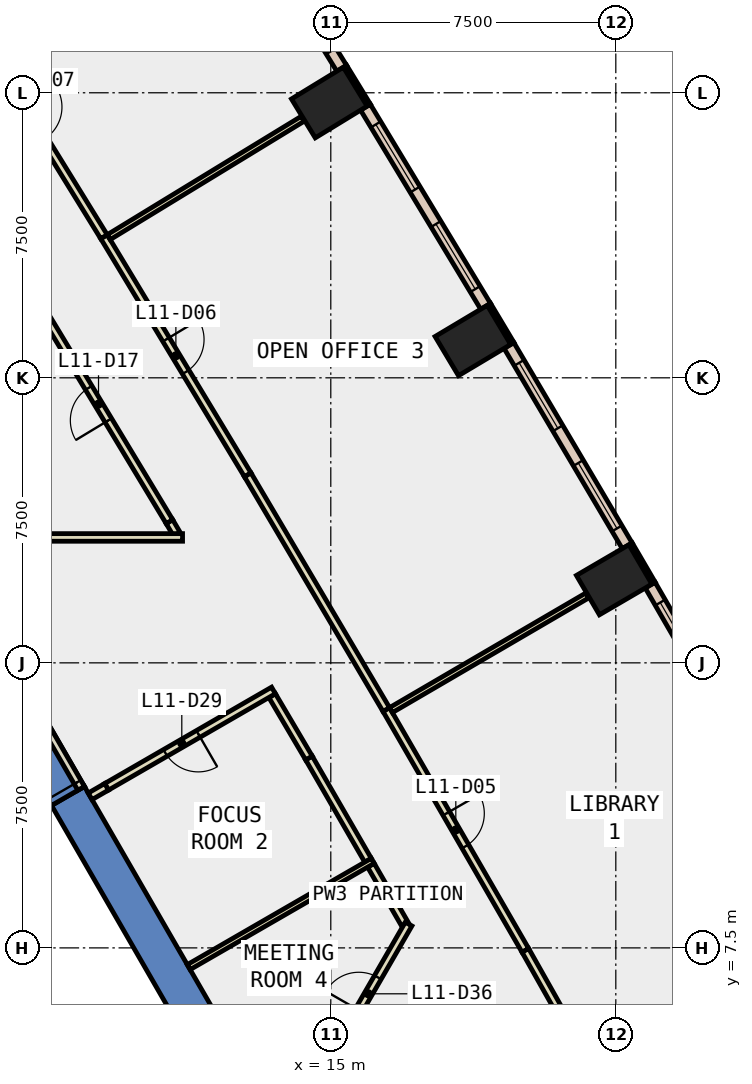
"""IFC4 building model, lengths in metres.
Left out: names, types, materials, properties, quantities, classifications, styles, units other than length and angle.
Written with IfcOpenShell. Run it as: python <this file> out.ifc"""

import sys

from ifc_helpers import new_model, si_unit, direction, frame, frame_2d, origin, origin_2d, place, context, subcontext, project, spatial, polyline, rectangle, outline, extrude, element, fill, save


model = new_model("IFC4")
c1 = context("Model", 3, precision=1e-05, world=origin(), true_north=direction((0.0, 1.0)))
c2 = subcontext(c1, "Body", "Model", "MODEL_VIEW")
j1 = project(units=[si_unit("LENGTHUNIT", "METRE"), si_unit("PLANEANGLEUNIT", "RADIAN")], contexts=[c1])
p1 = place(None, origin())
s1 = spatial("IfcSite", under=j1, at=p1, CompositionType="ELEMENT")
p2 = place(p1, origin())
s2 = spatial("IfcBuilding", under=s1, at=p2, CompositionType="ELEMENT")
p3 = place(p2, frame((0.0, 0.0, 56.0)))
s3 = spatial("IfcBuildingStorey", under=s2, at=p3, CompositionType="ELEMENT", Elevation=56.0)
for number, where, z_axis, x_axis in (
    (1, (22.457, 17.186, -0.4), (0.0, 0.0, 1.0), (-0.504, 0.864, 0.0)),
    (2, (18.739, 23.482, -0.4), (0.0, 0.0, 1.0), (-0.513, 0.858, 0.0)),
    (3, (14.961, 29.743, -0.4), (0.0, 0.0, 1.0), (-0.522, 0.853, 0.0)),
):
    element("IfcColumn", number, at=place(p3, frame(where, z_axis=z_axis, x_axis=x_axis)), inside=s3, PredefinedType="COLUMN", context=c2, shape_type="SweptSolid", body=[
        extrude(rectangle(XDim=1.2, YDim=1.6, at=origin_2d()), origin(), (0.0, 0.0, 1.0), 4.2),
    ])
p4 = place(p3, frame((0.0, 0.0, -0.4)))
e4 = element("IfcWall", 4, at=p4, inside=s3, PredefinedType="SHEAR", context=c2, shape_type="SweptSolid", body=[
    extrude(outline(polyline([(8.517, 11.748), (7.651, 11.248), (12.702, 2.5), (13.856, 2.5), (8.517, 11.748)])), origin(), (0.0, 0.0, 1.0), 4.2),
])
p5 = place(p3, frame((0.0, 0.0, 3.6)))
e5 = element("IfcWall", 5, at=p5, inside=s3, PredefinedType="SHEAR", context=c2, shape_type="SweptSolid", body=[
    extrude(outline(polyline([(7.517, 13.48), (6.651, 12.98), (7.651, 11.248), (8.517, 11.748), (7.517, 13.48)])), origin(), (0.0, 0.0, 1.0), 0.2),
])
p6 = place(p3, frame((23.493, 17.097, 0.0), z_axis=(0.0, 0.0, 1.0), x_axis=(-0.504225229382, 0.863572184623, 0.0)))
e6 = element("IfcWall", 6, at=p6, inside=s3, PredefinedType="STANDARD", context=c2, shape_type="SweptSolid", body=[
    extrude(rectangle(XDim=1.2, YDim=0.1, at=frame_2d((0.6, 0.0))), origin(), (0.0, 0.0, 1.0), 3.8),
])
for number, where, z_axis, x_axis in (
    (7, (19.777, 23.403, 0.0), (0.0, 0.0, 1.0), (-0.513, 0.858, 0.0)),
    (8, (15.999, 29.674, 0.0), (0.0, 0.0, 1.0), (-0.522, 0.853, 0.0)),
):
    element("IfcWall", number, at=place(p3, frame(where, z_axis=z_axis, x_axis=x_axis)), inside=s3, PredefinedType="STANDARD", context=c2, shape_type="SweptSolid", body=[
        extrude(rectangle(XDim=1.2, YDim=0.1, at=frame_2d((0.6, 0.0))), origin(), (0.0, 0.0, 1.0), 3.8),
    ])
p7 = place(p3, frame((26.464, 11.745, 0.0), z_axis=(0.0, 0.0, 1.0), x_axis=(-0.499957248001, 0.866050085256, 0.0)))
e9 = element("IfcWall", 9, at=p7, inside=s3, PredefinedType="STANDARD", context=c2, shape_type="SweptSolid", body=[
    extrude(rectangle(XDim=6.121, YDim=0.3, at=frame_2d((3.06, 0.0))), origin(), (0.0, 0.0, 1.0), 3.8),
])
p8 = place(p7, frame((0.53, 0.0, 0.9)))
e10 = element("IfcOpeningElement", 10, at=p8, cuts=e9, PredefinedType="OPENING", context=c2, shape_type="SweptSolid", body=[
    extrude(rectangle(XDim=2.0, YDim=2.6, at=frame_2d((1.0, 1.3))), frame((0.0, 0.16, 0.0), z_axis=(0.0, -1.0, 0.0), x_axis=(1.0, 0.0, 0.0)), (0.0, 0.0, 1.0), 0.32),
])
p9 = place(p7, frame((3.591, 0.0, 0.9)))
e11 = element("IfcOpeningElement", 11, at=p9, cuts=e9, PredefinedType="OPENING", context=c2, shape_type="SweptSolid", body=[
    extrude(rectangle(XDim=2.0, YDim=2.6, at=frame_2d((1.0, 1.3))), frame((0.0, 0.16, 0.0), z_axis=(0.0, -1.0, 0.0), x_axis=(1.0, 0.0, 0.0)), (0.0, 0.0, 1.0), 0.32),
])
p10 = place(p3, frame((22.8, 18.08, 0.0), z_axis=(0.0, 0.0, 1.0), x_axis=(-0.508412153373, 0.861113861404, 0.0)))
e12 = element("IfcWall", 12, at=p10, inside=s3, PredefinedType="STANDARD", context=c2, shape_type="SweptSolid", body=[
    extrude(rectangle(XDim=6.121, YDim=0.3, at=frame_2d((3.061, 0.0))), origin(), (0.0, 0.0, 1.0), 3.8),
])
p11 = place(p10, frame((0.53, 0.0, 0.9)))
e13 = element("IfcOpeningElement", 13, at=p11, cuts=e12, PredefinedType="OPENING", context=c2, shape_type="SweptSolid", body=[
    extrude(rectangle(XDim=2.0, YDim=2.6, at=frame_2d((1.0, 1.3))), frame((0.0, 0.16, 0.0), z_axis=(0.0, -1.0, 0.0), x_axis=(1.0, 0.0, 0.0)), (0.0, 0.0, 1.0), 0.32),
])
p12 = place(p10, frame((3.591, 0.0, 0.9)))
e14 = element("IfcOpeningElement", 14, at=p12, cuts=e12, PredefinedType="OPENING", context=c2, shape_type="SweptSolid", body=[
    extrude(rectangle(XDim=2.0, YDim=2.6, at=frame_2d((1.0, 1.3))), frame((0.0, 0.16, 0.0), z_axis=(0.0, -1.0, 0.0), x_axis=(1.0, 0.0, 0.0)), (0.0, 0.0, 1.0), 0.32),
])
p13 = place(p3, frame((19.074, 24.38, 0.0), z_axis=(0.0, 0.0, 1.0), x_axis=(-0.516699243123, 0.856166976796, 0.0)))
e15 = element("IfcWall", 15, at=p13, inside=s3, PredefinedType="STANDARD", context=c2, shape_type="SweptSolid", body=[
    extrude(rectangle(XDim=6.122, YDim=0.3, at=frame_2d((3.061, 0.0))), origin(), (0.0, 0.0, 1.0), 3.8),
])
p14 = place(p13, frame((0.53, 0.0, 0.9)))
e16 = element("IfcOpeningElement", 16, at=p14, cuts=e15, PredefinedType="OPENING", context=c2, shape_type="SweptSolid", body=[
    extrude(rectangle(XDim=2.0, YDim=2.6, at=frame_2d((1.0, 1.3))), frame((0.0, 0.16, 0.0), z_axis=(0.0, -1.0, 0.0), x_axis=(1.0, 0.0, 0.0)), (0.0, 0.0, 1.0), 0.32),
])
p15 = place(p13, frame((3.591, 0.0, 0.9)))
e17 = element("IfcOpeningElement", 17, at=p15, cuts=e15, PredefinedType="OPENING", context=c2, shape_type="SweptSolid", body=[
    extrude(rectangle(XDim=2.0, YDim=2.6, at=frame_2d((1.0, 1.3))), frame((0.0, 0.16, 0.0), z_axis=(0.0, -1.0, 0.0), x_axis=(1.0, 0.0, 0.0)), (0.0, 0.0, 1.0), 0.32),
])
p16 = place(p3, frame((15.287, 30.644, 0.0), z_axis=(0.0, 0.0, 1.0), x_axis=(-0.525114088226, 0.851031840971, 0.0)))
e18 = element("IfcWall", 18, at=p16, inside=s3, PredefinedType="STANDARD", context=c2, shape_type="SweptSolid", body=[
    extrude(rectangle(XDim=6.121, YDim=0.3, at=frame_2d((3.061, 0.0))), origin(), (0.0, 0.0, 1.0), 3.8),
])
p17 = place(p16, frame((0.53, 0.0, 0.9)))
e19 = element("IfcOpeningElement", 19, at=p17, cuts=e18, PredefinedType="OPENING", context=c2, shape_type="SweptSolid", body=[
    extrude(rectangle(XDim=2.0, YDim=2.6, at=frame_2d((1.0, 1.3))), frame((0.0, 0.16, 0.0), z_axis=(0.0, -1.0, 0.0), x_axis=(1.0, 0.0, 0.0)), (0.0, 0.0, 1.0), 0.32),
])
p18 = place(p16, frame((3.591, 0.0, 0.9)))
e20 = element("IfcOpeningElement", 20, at=p18, cuts=e18, PredefinedType="OPENING", context=c2, shape_type="SweptSolid", body=[
    extrude(rectangle(XDim=2.0, YDim=2.6, at=frame_2d((1.0, 1.3))), frame((0.0, 0.16, 0.0), z_axis=(0.0, -1.0, 0.0), x_axis=(1.0, 0.0, 0.0)), (0.0, 0.0, 1.0), 0.32),
])
p19 = place(p3, frame((15.98, 9.805, 0.0), z_axis=(0.0, 0.0, 1.0), x_axis=(-0.500150684419, 0.865938388614, 0.0)))
e21 = element("IfcWall", 21, at=p19, inside=s3, PredefinedType="PARTITIONING", context=c2, shape_type="SweptSolid", body=[
    extrude(rectangle(XDim=3.109, YDim=0.2, at=frame_2d((1.554, 0.0))), origin(), (0.0, 0.0, 1.0), 3.8),
])
p20 = place(p3, frame((14.425, 12.497, 0.0), z_axis=(0.0, 0.0, 1.0), x_axis=(-0.508111788435, 0.861291129905, 0.0)))
e22 = element("IfcWall", 22, at=p20, inside=s3, PredefinedType="PARTITIONING", context=c2, shape_type="SweptSolid", body=[
    extrude(rectangle(XDim=1.905, YDim=0.2, at=frame_2d((0.953, 0.0))), origin(), (0.0, 0.0, 1.0), 3.8),
])
p21 = place(p3, frame((13.492, 14.274, 0.0), z_axis=(0.0, 0.0, 1.0), x_axis=(-0.866003598361, -0.5000377662, 0.0)))
e23 = element("IfcWall", 23, at=p21, inside=s3, PredefinedType="PARTITIONING", context=c2, shape_type="SweptSolid", body=[
    extrude(rectangle(XDim=5.071, YDim=0.2, at=frame_2d((2.536, 0.0))), origin(), (0.0, 0.0, 1.0), 3.8),
])
p22 = place(p21, frame((2.286, 0.0, 0.0)))
e24 = element("IfcOpeningElement", 24, at=p22, cuts=e23, PredefinedType="OPENING", context=c2, shape_type="SweptSolid", body=[
    extrude(rectangle(XDim=1.0, YDim=2.1, at=frame_2d((0.5, 1.05))), frame((0.0, 0.11, 0.0), z_axis=(0.0, -1.0, 0.0), x_axis=(1.0, 0.0, 0.0)), (0.0, 0.0, 1.0), 0.22),
])
p23 = place(p3, frame((16.948, 8.128, 0.0), z_axis=(0.0, 0.0, 1.0), x_axis=(-0.499931460552, 0.866064971437, 0.0)))
e25 = element("IfcWall", 25, at=p23, inside=s3, PredefinedType="PARTITIONING", context=c2, shape_type="SweptSolid", body=[
    extrude(rectangle(XDim=1.786, YDim=0.2, at=frame_2d((0.893, 0.0))), origin(), (0.0, 0.0, 1.0), 3.8),
])
p24 = place(p3, frame((10.948, 18.386, 0.0), z_axis=(0.0, 0.0, 1.0), x_axis=(-0.506880801681, 0.862016155815, 0.0)))
e26 = element("IfcWall", 26, at=p24, inside=s3, PredefinedType="PARTITIONING", context=c2, shape_type="SweptSolid", body=[
    extrude(rectangle(XDim=0.383, YDim=0.2, at=frame_2d((0.191, 0.0))), origin(), (0.0, 0.0, 1.0), 3.8),
])
p25 = place(p3, frame((10.754, 18.716, 0.0), z_axis=(0.0, 0.0, 1.0), x_axis=(-0.516755973305, 0.856132737403, 0.0)))
e27 = element("IfcWall", 27, at=p25, inside=s3, PredefinedType="PARTITIONING", context=c2, shape_type="SweptSolid", body=[
    extrude(rectangle(XDim=7.222, YDim=0.2, at=frame_2d((3.611, 0.0))), origin(), (0.0, 0.0, 1.0), 3.8),
])
p26 = place(p25, frame((3.111, 0.0, 0.0)))
e28 = element("IfcOpeningElement", 28, at=p26, cuts=e27, PredefinedType="OPENING", context=c2, shape_type="SweptSolid", body=[
    extrude(rectangle(XDim=1.0, YDim=2.1, at=frame_2d((0.5, 1.05))), frame((0.0, 0.11, 0.0), z_axis=(0.0, -1.0, 0.0), x_axis=(1.0, 0.0, 0.0)), (0.0, 0.0, 1.0), 0.22),
])
p27 = place(p3, frame((16.46, 13.772, 0.0), z_axis=(0.0, 0.0, 1.0), x_axis=(0.500099745063, -0.865967808286, 0.0)))
e29 = element("IfcWall", 29, at=p27, inside=s3, PredefinedType="PARTITIONING", context=c2, shape_type="SweptSolid", body=[
    extrude(rectangle(XDim=7.319, YDim=0.2, at=frame_2d((3.659, 0.0))), origin(), (0.0, 0.0, 1.0), 3.8),
])
p28 = place(p27, frame((3.159, 0.0, 0.0)))
e30 = element("IfcOpeningElement", 30, at=p28, cuts=e29, PredefinedType="OPENING", context=c2, shape_type="SweptSolid", body=[
    extrude(rectangle(XDim=1.0, YDim=2.1, at=frame_2d((0.5, 1.05))), frame((0.0, 0.11, 0.0), z_axis=(0.0, -1.0, 0.0), x_axis=(1.0, 0.0, 0.0)), (0.0, 0.0, 1.0), 0.22),
])
p29 = place(p3, frame((20.12, 7.434, 0.0), z_axis=(0.0, 0.0, 1.0), x_axis=(0.491394823876, -0.87093692485, 0.0)))
e31 = element("IfcWall", 31, at=p29, inside=s3, PredefinedType="PARTITIONING", context=c2, shape_type="SweptSolid", body=[
    extrude(rectangle(XDim=3.547, YDim=0.2, at=frame_2d((1.773, 0.0))), origin(), (0.0, 0.0, 1.0), 3.8),
])
p30 = place(p3, frame((9.032, 26.213, 0.0), z_axis=(0.0, 0.0, 1.0), x_axis=(0.516789314756, -0.856112611841, 0.0)))
e32 = element("IfcWall", 32, at=p30, inside=s3, PredefinedType="PARTITIONING", context=c2, shape_type="SweptSolid", body=[
    extrude(rectangle(XDim=7.32, YDim=0.2, at=frame_2d((3.66, 0.0))), origin(), (0.0, 0.0, 1.0), 3.8),
])
p31 = place(p30, frame((3.16, 0.0, 0.0)))
e33 = element("IfcOpeningElement", 33, at=p31, cuts=e32, PredefinedType="OPENING", context=c2, shape_type="SweptSolid", body=[
    extrude(rectangle(XDim=1.0, YDim=2.1, at=frame_2d((0.5, 1.05))), frame((0.0, 0.11, 0.0), z_axis=(0.0, -1.0, 0.0), x_axis=(1.0, 0.0, 0.0)), (0.0, 0.0, 1.0), 0.22),
])
p32 = place(p3, frame((12.815, 19.946, 0.0), z_axis=(0.0, 0.0, 1.0), x_axis=(0.508287536166, -0.861187424768, 0.0)))
e34 = element("IfcWall", 34, at=p32, inside=s3, PredefinedType="PARTITIONING", context=c2, shape_type="SweptSolid", body=[
    extrude(rectangle(XDim=7.169, YDim=0.2, at=frame_2d((3.584, 0.0))), origin(), (0.0, 0.0, 1.0), 3.8),
])
p33 = place(p3, frame((5.267, 32.315, 0.0), z_axis=(0.0, 0.0, 1.0), x_axis=(0.524988204957, -0.851109502153, 0.0)))
e35 = element("IfcWall", 35, at=p33, inside=s3, PredefinedType="PARTITIONING", context=c2, shape_type="SweptSolid", body=[
    extrude(rectangle(XDim=7.169, YDim=0.2, at=frame_2d((3.585, 0.0))), origin(), (0.0, 0.0, 1.0), 3.8),
])
p34 = place(p33, frame((3.16, 0.0, 0.0)))
e36 = element("IfcOpeningElement", 36, at=p34, cuts=e35, PredefinedType="OPENING", context=c2, shape_type="SweptSolid", body=[
    extrude(rectangle(XDim=1.0, YDim=2.1, at=frame_2d((0.5, 1.05))), frame((0.0, 0.11, 0.0), z_axis=(0.0, -1.0, 0.0), x_axis=(1.0, 0.0, 0.0)), (0.0, 0.0, 1.0), 0.22),
])
p35 = place(p3, frame((16.104, 9.79, 0.0), z_axis=(0.0, 0.0, 1.0), x_axis=(-0.866023462144, -0.500003363005, 0.0)))
e37 = element("IfcWall", 37, at=p35, inside=s3, PredefinedType="PARTITIONING", context=c2, shape_type="SweptSolid", body=[
    extrude(rectangle(XDim=5.592, YDim=0.15, at=frame_2d((2.796, 0.0))), origin(), (0.0, 0.0, 1.0), 3.8),
])
p36 = place(p3, frame((13.827, 2.55, 0.0), z_axis=(0.0, 0.0, 1.0), x_axis=(0.500093193185, 0.865971591988, 0.0)))
e38 = element("IfcWall", 38, at=p36, inside=s3, PredefinedType="PARTITIONING", context=c2, shape_type="SweptSolid", body=[
    extrude(rectangle(XDim=6.441, YDim=0.2, at=frame_2d((3.221, 0.0))), origin(), (0.0, 0.0, 1.0), 3.8),
])
p37 = place(p36, frame((2.721, 0.0, 0.0)))
e39 = element("IfcOpeningElement", 39, at=p37, cuts=e38, PredefinedType="OPENING", context=c2, shape_type="SweptSolid", body=[
    extrude(rectangle(XDim=1.0, YDim=2.1, at=frame_2d((0.5, 1.05))), frame((0.0, 0.11, 0.0), z_axis=(0.0, -1.0, 0.0), x_axis=(1.0, 0.0, 0.0)), (0.0, 0.0, 1.0), 0.22),
])
p38 = place(p36, frame((3.821, 0.0, 0.0)))
e40 = element("IfcOpeningElement", 40, at=p38, cuts=e38, PredefinedType="OPENING", context=c2, shape_type="SweptSolid", body=[
    extrude(rectangle(XDim=1.0, YDim=2.1, at=frame_2d((0.5, 1.05))), frame((0.0, 0.11, 0.0), z_axis=(0.0, -1.0, 0.0), x_axis=(1.0, 0.0, 0.0)), (0.0, 0.0, 1.0), 0.22),
])
p39 = place(p3, frame((0.4, 18.3, 0.0), z_axis=(0.0, 0.0, 1.0), x_axis=(1.0, 0.0, 0.0)))
e41 = element("IfcWall", 41, at=p39, inside=s3, PredefinedType="PARTITIONING", context=c2, shape_type="SweptSolid", body=[
    extrude(rectangle(XDim=10.699, YDim=0.2, at=frame_2d((5.35, 0.0))), origin(), (0.0, 0.0, 1.0), 3.8),
])
p40 = place(p3, frame((21.813, 4.231, 0.0), z_axis=(0.0, 0.0, 1.0), x_axis=(0.870901264369, 0.491458022337, 0.0)))
e42 = element("IfcWall", 42, at=p40, inside=s3, PredefinedType="PARTITIONING", context=c2, shape_type="SweptSolid", body=[
    extrude(rectangle(XDim=7.6, YDim=0.15, at=frame_2d((3.8, 0.0))), origin(), (0.0, 0.0, 1.0), 3.8),
])
p41 = place(p3, frame((16.584, 13.757, 0.0), z_axis=(0.0, 0.0, 1.0), x_axis=(0.863565634474, 0.504236447469, 0.0)))
e43 = element("IfcWall", 43, at=p41, inside=s3, PredefinedType="PARTITIONING", context=c2, shape_type="SweptSolid", body=[
    extrude(rectangle(XDim=5.981, YDim=0.15, at=frame_2d((2.99, 0.0))), origin(), (0.0, 0.0, 1.0), 3.8),
])
p42 = place(p3, frame((9.156, 26.201, 0.0), z_axis=(0.0, 0.0, 1.0), x_axis=(0.853632819511, 0.520875234057, 0.0)))
e44 = element("IfcWall", 44, at=p42, inside=s3, PredefinedType="PARTITIONING", context=c2, shape_type="SweptSolid", body=[
    extrude(rectangle(XDim=5.98, YDim=0.15, at=frame_2d((2.99, 0.0))), origin(), (0.0, 0.0, 1.0), 3.8),
])
p43 = place(p3, frame((8.43, 11.698, 0.0), z_axis=(0.0, 0.0, 1.0), x_axis=(-0.50002537861, 0.866010750942, 0.0)))
e45 = element("IfcWall", 45, at=p43, inside=s3, PredefinedType="PARTITIONING", context=c2, shape_type="SweptSolid", body=[
    extrude(rectangle(XDim=2.0, YDim=0.2, at=frame_2d((1.0, 0.0))), origin(), (0.0, 0.0, 1.0), 2.4),
])
p44 = place(p43, frame((0.19, 0.0, 0.0)))
e46 = element("IfcOpeningElement", 46, at=p44, cuts=e45, PredefinedType="OPENING", context=c2, shape_type="SweptSolid", body=[
    extrude(rectangle(XDim=1.8, YDim=2.1, at=frame_2d((0.9, 1.05))), frame((0.0, 0.11, 0.0), z_axis=(0.0, -1.0, 0.0), x_axis=(1.0, 0.0, 0.0)), (0.0, 0.0, 1.0), 0.22),
])
p45 = place(p3, frame((9.1, 11.738, 0.0), z_axis=(0.0, 0.0, 1.0), x_axis=(-0.866071776036, -0.499919672301, 0.0)))
e47 = element("IfcWall", 47, at=p45, inside=s3, PredefinedType="PARTITIONING", context=c2, shape_type="SweptSolid", body=[
    extrude(rectangle(XDim=0.5, YDim=0.2, at=frame_2d((0.25, 0.0))), origin(), (0.0, 0.0, 1.0), 2.4),
])
p46 = place(p3, frame((8.48, 3.412, 0.0), z_axis=(0.0, 0.0, 1.0), x_axis=(-0.499978703459, 0.866037698999, 0.0)))
e48 = element("IfcWall", 48, at=p46, inside=s3, PredefinedType="STANDARD", context=c2, shape_type="SweptSolid", body=[
    extrude(rectangle(XDim=6.9, YDim=0.2, at=frame_2d((3.45, 0.0))), origin(), (0.0, 0.0, 1.0), 3.8),
])
p47 = place(p9, origin())
e49 = element("IfcWindow", 49, at=p47, inside=s3, PartitioningType="SINGLE_PANEL", PredefinedType="WINDOW", context=c2, shape_type="SweptSolid", body=[
    extrude(rectangle(XDim=2.0, YDim=2.6, at=frame_2d((1.0, 1.3))), frame((0.0, 0.03, 0.0), z_axis=(0.0, -1.0, 0.0), x_axis=(1.0, 0.0, 0.0)), (0.0, 0.0, 1.0), 0.06),
])
fill(e11, e49)
p48 = place(p11, origin())
e50 = element("IfcWindow", 50, at=p48, inside=s3, PartitioningType="SINGLE_PANEL", PredefinedType="WINDOW", context=c2, shape_type="SweptSolid", body=[
    extrude(rectangle(XDim=2.0, YDim=2.6, at=frame_2d((1.0, 1.3))), frame((0.0, 0.03, 0.0), z_axis=(0.0, -1.0, 0.0), x_axis=(1.0, 0.0, 0.0)), (0.0, 0.0, 1.0), 0.06),
])
fill(e13, e50)
p49 = place(p12, origin())
e51 = element("IfcWindow", 51, at=p49, inside=s3, PartitioningType="SINGLE_PANEL", PredefinedType="WINDOW", context=c2, shape_type="SweptSolid", body=[
    extrude(rectangle(XDim=2.0, YDim=2.6, at=frame_2d((1.0, 1.3))), frame((0.0, 0.03, 0.0), z_axis=(0.0, -1.0, 0.0), x_axis=(1.0, 0.0, 0.0)), (0.0, 0.0, 1.0), 0.06),
])
fill(e14, e51)
p50 = place(p14, origin())
e52 = element("IfcWindow", 52, at=p50, inside=s3, PartitioningType="SINGLE_PANEL", PredefinedType="WINDOW", context=c2, shape_type="SweptSolid", body=[
    extrude(rectangle(XDim=2.0, YDim=2.6, at=frame_2d((1.0, 1.3))), frame((0.0, 0.03, 0.0), z_axis=(0.0, -1.0, 0.0), x_axis=(1.0, 0.0, 0.0)), (0.0, 0.0, 1.0), 0.06),
])
fill(e16, e52)
p51 = place(p15, origin())
e53 = element("IfcWindow", 53, at=p51, inside=s3, PartitioningType="SINGLE_PANEL", PredefinedType="WINDOW", context=c2, shape_type="SweptSolid", body=[
    extrude(rectangle(XDim=2.0, YDim=2.6, at=frame_2d((1.0, 1.3))), frame((0.0, 0.03, 0.0), z_axis=(0.0, -1.0, 0.0), x_axis=(1.0, 0.0, 0.0)), (0.0, 0.0, 1.0), 0.06),
])
fill(e17, e53)
p52 = place(p28, origin())
e54 = element("IfcDoor", 54, at=p52, inside=s3, OperationType="SINGLE_SWING_LEFT", PredefinedType="DOOR", context=c2, shape_type="SweptSolid", body=[
    extrude(rectangle(XDim=1.0, YDim=2.1, at=frame_2d((0.5, 1.05))), frame((0.0, 0.025, 0.0), z_axis=(0.0, -1.0, 0.0), x_axis=(1.0, 0.0, 0.0)), (0.0, 0.0, 1.0), 0.05),
])
fill(e30, e54)
p53 = place(p31, origin())
e55 = element("IfcDoor", 55, at=p53, inside=s3, OperationType="SINGLE_SWING_LEFT", PredefinedType="DOOR", context=c2, shape_type="SweptSolid", body=[
    extrude(rectangle(XDim=1.0, YDim=2.1, at=frame_2d((0.5, 1.05))), frame((0.0, 0.025, 0.0), z_axis=(0.0, -1.0, 0.0), x_axis=(1.0, 0.0, 0.0)), (0.0, 0.0, 1.0), 0.05),
])
fill(e33, e55)
p54 = place(p26, origin())
e56 = element("IfcDoor", 56, at=p54, inside=s3, OperationType="SINGLE_SWING_LEFT", PredefinedType="DOOR", context=c2, shape_type="SweptSolid", body=[
    extrude(rectangle(XDim=1.0, YDim=2.1, at=frame_2d((0.5, 1.05))), frame((0.0, 0.025, 0.0), z_axis=(0.0, -1.0, 0.0), x_axis=(1.0, 0.0, 0.0)), (0.0, 0.0, 1.0), 0.05),
])
fill(e28, e56)
p55 = place(p22, origin())
e57 = element("IfcDoor", 57, at=p55, inside=s3, OperationType="SINGLE_SWING_LEFT", PredefinedType="DOOR", context=c2, shape_type="SweptSolid", body=[
    extrude(rectangle(XDim=1.0, YDim=2.1, at=frame_2d((0.5, 1.05))), frame((0.0, 0.025, 0.0), z_axis=(0.0, -1.0, 0.0), x_axis=(1.0, 0.0, 0.0)), (0.0, 0.0, 1.0), 0.05),
])
fill(e24, e57)
p56 = place(p38, origin())
e58 = element("IfcDoor", 58, at=p56, inside=s3, OperationType="SINGLE_SWING_RIGHT", PredefinedType="DOOR", context=c2, shape_type="SweptSolid", body=[
    extrude(rectangle(XDim=1.0, YDim=2.1, at=frame_2d((0.5, 1.05))), frame((0.0, 0.025, 0.0), z_axis=(0.0, -1.0, 0.0), x_axis=(1.0, 0.0, 0.0)), (0.0, 0.0, 1.0), 0.05),
])
fill(e40, e58)
p57 = place(p44, origin())
e59 = element("IfcDoor", 59, at=p57, inside=s3, OperationType="DOUBLE_DOOR_SINGLE_SWING", PredefinedType="DOOR", context=c2, shape_type="SweptSolid", body=[
    extrude(rectangle(XDim=1.8, YDim=2.1, at=frame_2d((0.9, 1.05))), frame((0.0, 0.025, 0.0), z_axis=(0.0, -1.0, 0.0), x_axis=(1.0, 0.0, 0.0)), (0.0, 0.0, 1.0), 0.05),
])
fill(e46, e59)
save(model, sys.argv[1])
